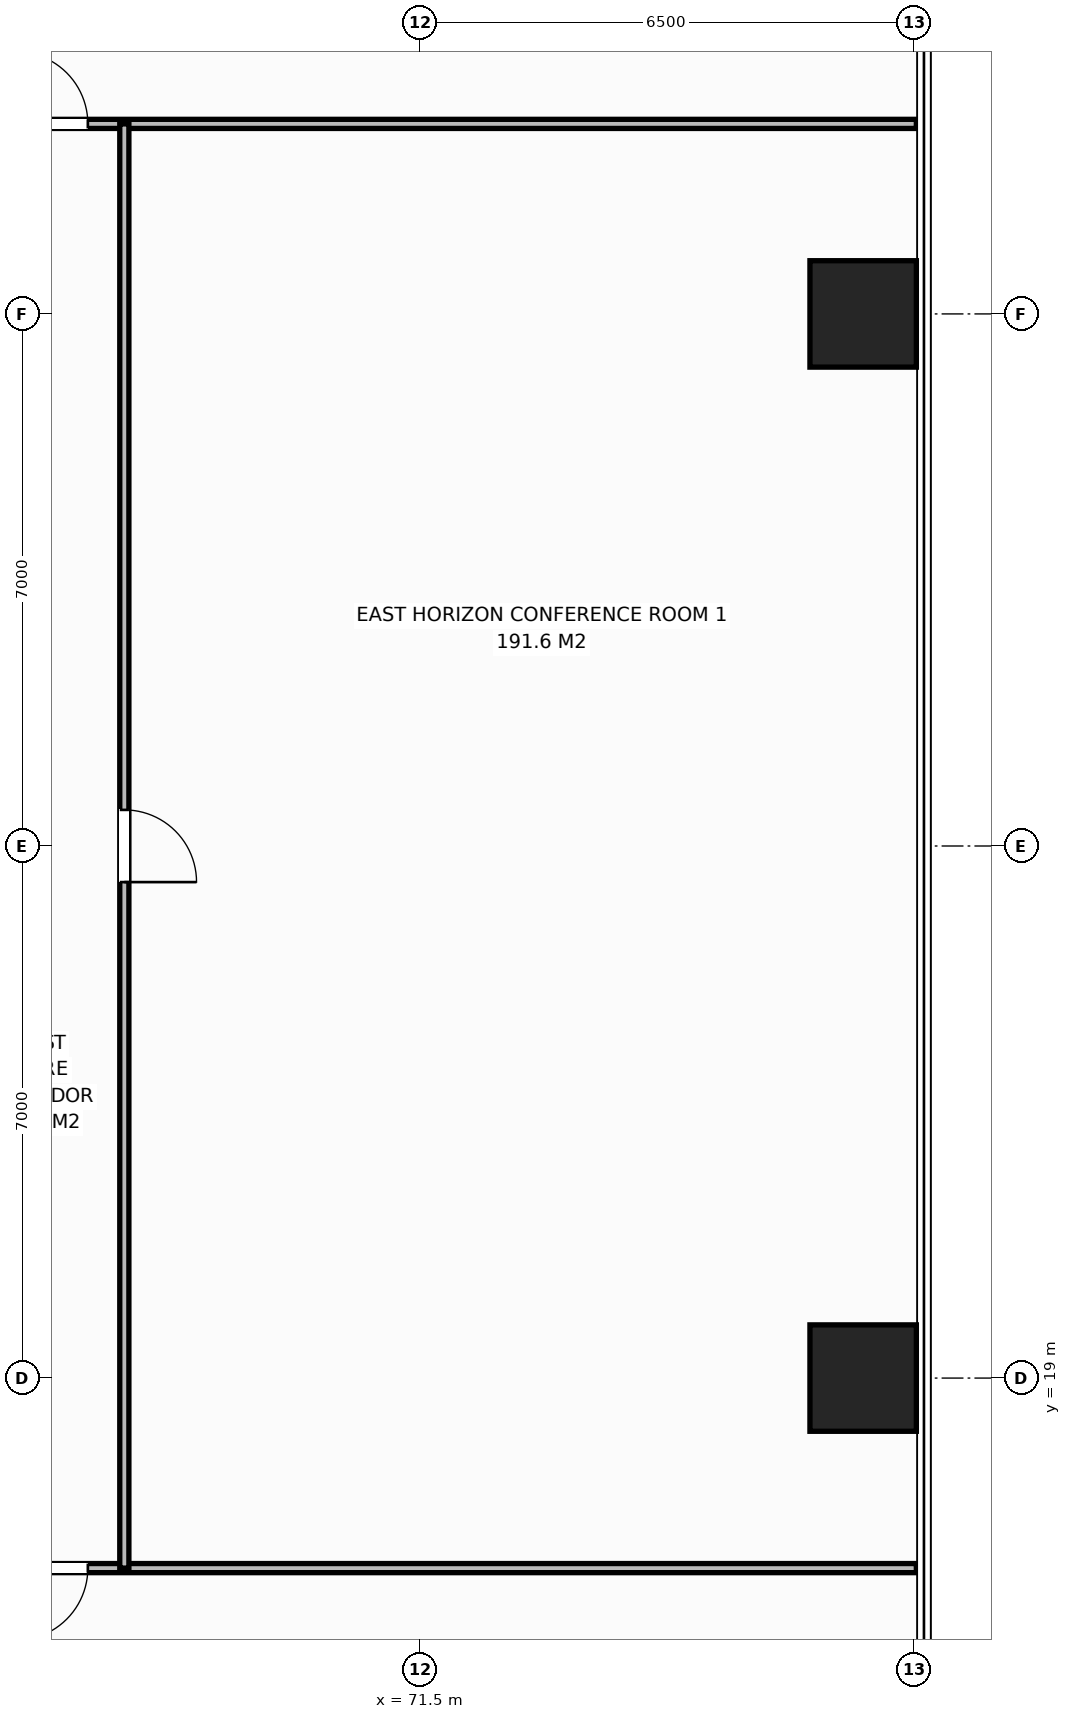
"""IFC4 building model, lengths in metres.
Left out: names, types, materials, properties, quantities, classifications, styles, units other than length and angle.
Written with IfcOpenShell. Run it as: python <this file> out.ifc"""

import sys

from ifc_helpers import new_model, si_unit, direction, frame, frame_2d, origin, origin_2d, place, context, subcontext, project, spatial, rectangle, extrude, element, fill, save


model = new_model("IFC4")
c1 = context("Model", 3, precision=1e-05, world=origin(), true_north=direction((0.0, 1.0)))
c2 = subcontext(c1, "Body", "Model", "MODEL_VIEW")
j1 = project(units=[si_unit("LENGTHUNIT", "METRE"), si_unit("PLANEANGLEUNIT", "RADIAN")], contexts=[c1])
p1 = place(None, origin())
s1 = spatial("IfcSite", under=j1, at=p1, CompositionType="ELEMENT")
p2 = place(p1, origin())
s2 = spatial("IfcBuilding", under=s1, at=p2, CompositionType="ELEMENT")
p3 = place(p2, frame((0.0, 0.0, 54.4)))
s3 = spatial("IfcBuildingStorey", under=s2, at=p3, CompositionType="ELEMENT", Elevation=54.4)
for number, where, z_axis, x_axis in (
    (1, (77.32, 19.0, 0.0), (0.0, 0.0, 1.0), (1.0, 0.0, 0.0)),
    (2, (77.32, 33.0, 0.0), (0.0, 0.0, 1.0), (1.0, 0.0, 0.0)),
):
    element("IfcColumn", number, at=place(p3, frame(where, z_axis=z_axis, x_axis=x_axis)), inside=s3, PredefinedType="COLUMN", context=c2, shape_type="SweptSolid", body=[
        extrude(rectangle(XDim=1.4, YDim=1.4, at=origin_2d()), origin(), (0.0, 0.0, 1.0), 3.8),
    ])
p4 = place(p3, frame((64.86, 35.5, 0.0), z_axis=(0.0, 0.0, 1.0), x_axis=(1.0, 0.0, 0.0)))
e3 = element("IfcWall", 3, at=p4, inside=s3, PredefinedType="PARTITIONING", context=c2, shape_type="SweptSolid", body=[
    extrude(rectangle(XDim=13.16, YDim=0.12, at=frame_2d((6.58, 0.0))), origin(), (0.0, 0.0, 1.0), 3.55),
])
p5 = place(p4, frame((1.31, 0.0, 0.0)))
e4 = element("IfcOpeningElement", 4, at=p5, cuts=e3, PredefinedType="OPENING", context=c2, shape_type="SweptSolid", body=[
    extrude(rectangle(XDim=0.95, YDim=2.15, at=frame_2d((0.475, 1.075))), frame((0.0, 0.07, 0.0), z_axis=(0.0, -1.0, 0.0), x_axis=(1.0, 0.0, 0.0)), (0.0, 0.0, 1.0), 0.14),
])
p6 = place(p3, frame((47.465, 16.5, 0.0), z_axis=(0.0, 0.0, 1.0), x_axis=(1.0, 0.0, 0.0)))
e5 = element("IfcWall", 5, at=p6, inside=s3, PredefinedType="PARTITIONING", context=c2, shape_type="SweptSolid", body=[
    extrude(rectangle(XDim=30.555, YDim=0.12, at=frame_2d((15.278, 0.0))), origin(), (0.0, 0.0, 1.0), 3.55),
])
p7 = place(p6, frame((18.705, 0.0, 0.0)))
e6 = element("IfcOpeningElement", 6, at=p7, cuts=e5, PredefinedType="OPENING", context=c2, shape_type="SweptSolid", body=[
    extrude(rectangle(XDim=0.95, YDim=2.15, at=frame_2d((0.475, 1.075))), frame((0.0, 0.07, 0.0), z_axis=(0.0, -1.0, 0.0), x_axis=(1.0, 0.0, 0.0)), (0.0, 0.0, 1.0), 0.14),
])
p8 = place(p3, frame((67.6, 16.5, 0.0), z_axis=(0.0, 0.0, 1.0), x_axis=(0.0, 1.0, 0.0)))
e7 = element("IfcWall", 7, at=p8, inside=s3, PredefinedType="PARTITIONING", context=c2, shape_type="SweptSolid", body=[
    extrude(rectangle(XDim=19.0, YDim=0.12, at=frame_2d((9.5, 0.0))), origin(), (0.0, 0.0, 1.0), 3.55),
])
p9 = place(p8, frame((9.025, 0.0, 0.0)))
e8 = element("IfcOpeningElement", 8, at=p9, cuts=e7, PredefinedType="OPENING", context=c2, shape_type="SweptSolid", body=[
    extrude(rectangle(XDim=0.95, YDim=2.15, at=frame_2d((0.475, 1.075))), frame((0.0, 0.07, 0.0), z_axis=(0.0, -1.0, 0.0), x_axis=(1.0, 0.0, 0.0)), (0.0, 0.0, 1.0), 0.14),
])
p10 = place(p5, origin())
e9 = element("IfcDoor", 9, at=p10, inside=s3, OperationType="SINGLE_SWING_LEFT", PredefinedType="DOOR", context=c2, shape_type="SweptSolid", body=[
    extrude(rectangle(XDim=0.95, YDim=2.15, at=frame_2d((0.475, 1.075))), frame((0.0, 0.025, 0.0), z_axis=(0.0, -1.0, 0.0), x_axis=(1.0, 0.0, 0.0)), (0.0, 0.0, 1.0), 0.05),
])
fill(e4, e9)
p11 = place(p7, origin())
e10 = element("IfcDoor", 10, at=p11, inside=s3, OperationType="SINGLE_SWING_RIGHT", PredefinedType="DOOR", context=c2, shape_type="SweptSolid", body=[
    extrude(rectangle(XDim=0.95, YDim=2.15, at=frame_2d((0.475, 1.075))), frame((0.0, 0.025, 0.0), z_axis=(0.0, -1.0, 0.0), x_axis=(1.0, 0.0, 0.0)), (0.0, 0.0, 1.0), 0.05),
])
fill(e6, e10)
p12 = place(p9, origin())
e11 = element("IfcDoor", 11, at=p12, inside=s3, OperationType="SINGLE_SWING_RIGHT", PredefinedType="DOOR", context=c2, shape_type="SweptSolid", body=[
    extrude(rectangle(XDim=0.95, YDim=2.15, at=frame_2d((0.475, 1.075))), frame((0.0, 0.025, 0.0), z_axis=(0.0, -1.0, 0.0), x_axis=(1.0, 0.0, 0.0)), (0.0, 0.0, 1.0), 0.05),
])
fill(e8, e11)
save(model, sys.argv[1])
